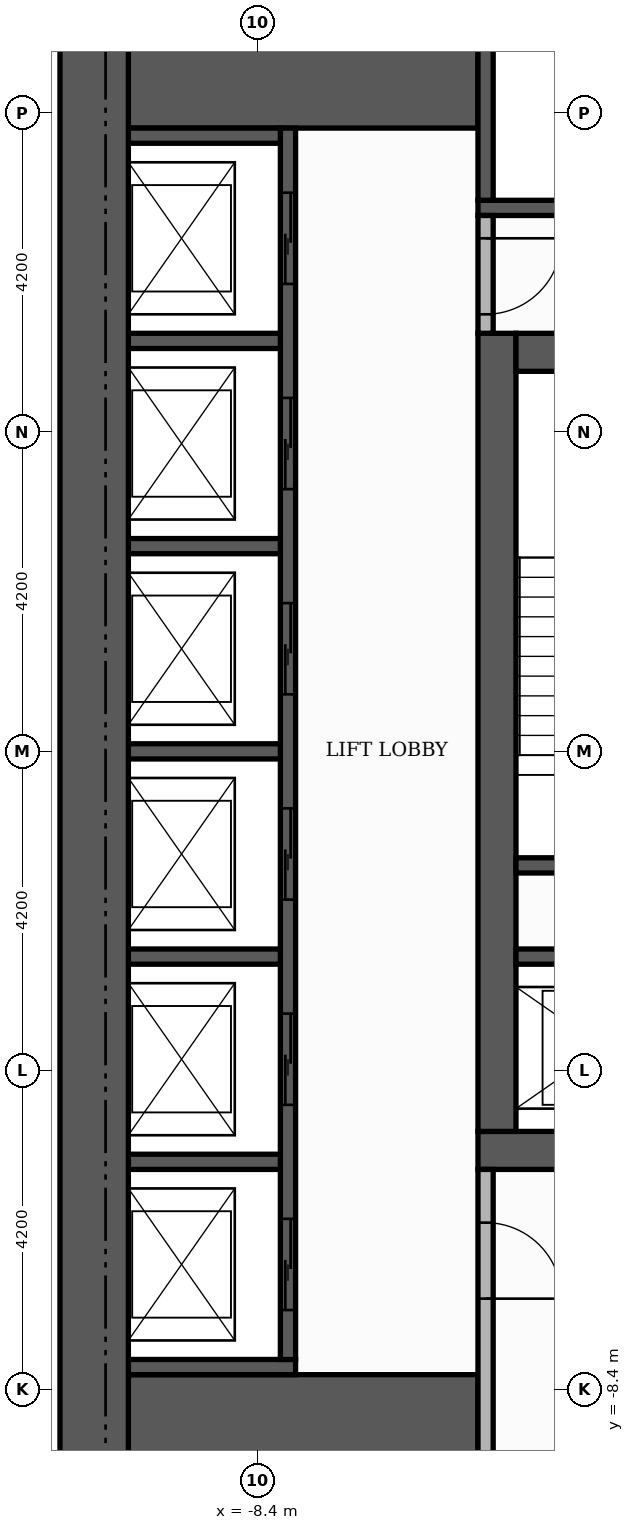
"""IFC4 building model, lengths in metres.
Left out: names, types, materials, properties, quantities, classifications, styles, units other than length and angle.
Written with IfcOpenShell. Run it as: python <this file> out.ifc"""

import sys

from ifc_helpers import new_model, si_unit, direction, frame, frame_2d, origin, place, context, subcontext, project, spatial, rectangle, extrude, element, fill, save


model = new_model("IFC4")
c1 = context("Model", 3, precision=1e-05, world=origin(), true_north=direction((0.0, 1.0)))
c2 = subcontext(c1, "Body", "Model", "MODEL_VIEW")
j1 = project(units=[si_unit("LENGTHUNIT", "METRE"), si_unit("PLANEANGLEUNIT", "RADIAN")], contexts=[c1])
p1 = place(None, origin())
s1 = spatial("IfcSite", under=j1, at=p1, CompositionType="ELEMENT")
p2 = place(p1, origin())
s2 = spatial("IfcBuilding", under=s1, at=p2, CompositionType="ELEMENT")
p3 = place(p2, frame((0.0, 0.0, 58.2)))
s3 = spatial("IfcBuildingStorey", under=s2, at=p3, CompositionType="ELEMENT", Elevation=58.2)
p4 = place(p3, frame((-5.5, -5.25, 0.0), z_axis=(0.0, 0.0, 1.0), x_axis=(1.0, 0.0, 0.0)))
e1 = element("IfcWall", 1, at=p4, inside=s3, PredefinedType="SHEAR", context=c2, shape_type="SweptSolid", body=[
    extrude(rectangle(XDim=11.0, YDim=0.5, at=frame_2d((5.5, 0.0))), origin(), (0.0, 0.0, 1.0), 3.48),
])
p5 = place(p4, frame((4.9, 0.0, 0.0)))
e2 = element("IfcOpeningElement", 2, at=p5, cuts=e1, PredefinedType="OPENING", context=c2, shape_type="SweptSolid", body=[
    extrude(rectangle(XDim=1.2, YDim=2.1, at=frame_2d((0.6, 1.05))), frame((0.0, 0.26, 0.0), z_axis=(0.0, -1.0, 0.0), x_axis=(1.0, 0.0, 0.0)), (0.0, 0.0, 1.0), 0.52),
])
p6 = place(p3, frame((-5.25, -5.0, 0.0), z_axis=(0.0, 0.0, 1.0), x_axis=(0.0, 1.0, 0.0)))
e3 = element("IfcWall", 3, at=p6, inside=s3, PredefinedType="SHEAR", context=c2, shape_type="SweptSolid", body=[
    extrude(rectangle(XDim=10.5, YDim=0.5, at=frame_2d((5.25, 0.0))), origin(), (0.0, 0.0, 1.0), 3.48),
])
p7 = place(p3, frame((-5.0, 5.25, 0.0), z_axis=(0.0, 0.0, 1.0), x_axis=(1.0, 0.0, 0.0)))
e4 = element("IfcWall", 4, at=p7, inside=s3, PredefinedType="SHEAR", context=c2, shape_type="SweptSolid", body=[
    extrude(rectangle(XDim=10.0, YDim=0.5, at=frame_2d((5.0, 0.0))), origin(), (0.0, 0.0, 1.0), 3.48),
])
p8 = place(p7, frame((4.4, 0.0, 0.0)))
e5 = element("IfcOpeningElement", 5, at=p8, cuts=e4, PredefinedType="OPENING", context=c2, shape_type="SweptSolid", body=[
    extrude(rectangle(XDim=1.2, YDim=2.1, at=frame_2d((0.6, 1.05))), frame((0.0, 0.26, 0.0), z_axis=(0.0, -1.0, 0.0), x_axis=(1.0, 0.0, 0.0)), (0.0, 0.0, 1.0), 0.52),
])
for number, where, z_axis, x_axis in (
    (6, (-10.1, -9.15, 0.0), (0.0, 0.0, 1.0), (1.0, 0.0, 0.0)),
    (7, (-10.1, 9.15, 0.0), (0.0, 0.0, 1.0), (1.0, 0.0, 0.0)),
):
    element("IfcWall", number, at=place(p3, frame(where, z_axis=z_axis, x_axis=x_axis)), inside=s3, PredefinedType="SHEAR", context=c2, shape_type="SweptSolid", body=[
        extrude(rectangle(XDim=4.6, YDim=1.9, at=frame_2d((2.3, 0.0))), origin(), (0.0, 0.0, 1.0), 3.48),
    ])
p9 = place(p3, frame((-5.0, -1.5, 0.0), z_axis=(0.0, 0.0, 1.0), x_axis=(1.0, 0.0, 0.0)))
e8 = element("IfcWall", 8, at=p9, inside=s3, PredefinedType="SHEAR", context=c2, shape_type="SweptSolid", body=[
    extrude(rectangle(XDim=3.05, YDim=0.2, at=frame_2d((1.525, 0.0))), origin(), (0.0, 0.0, 1.0), 3.48),
])
p10 = place(p3, frame((-5.5, 7.15, 0.0), z_axis=(0.0, 0.0, 1.0), x_axis=(1.0, 0.0, 0.0)))
e9 = element("IfcWall", 9, at=p10, inside=s3, PredefinedType="SHEAR", context=c2, shape_type="SweptSolid", body=[
    extrude(rectangle(XDim=6.8, YDim=0.2, at=frame_2d((3.4, 0.0))), origin(), (0.0, 0.0, 1.0), 3.48),
])
p11 = place(p3, frame((-5.4, 7.25, 0.0), z_axis=(0.0, 0.0, 1.0), x_axis=(0.0, 1.0, 0.0)))
e10 = element("IfcWall", 10, at=p11, inside=s3, PredefinedType="SHEAR", context=c2, shape_type="SweptSolid", body=[
    extrude(rectangle(XDim=2.85, YDim=0.2, at=frame_2d((1.425, 0.0))), origin(), (0.0, 0.0, 1.0), 3.48),
])
p12 = place(p3, frame((-10.1, -8.1, 0.0), z_axis=(0.0, 0.0, 1.0), x_axis=(1.0, 0.0, 0.0)))
e11 = element("IfcWall", 11, at=p12, inside=s3, PredefinedType="SHEAR", context=c2, shape_type="SweptSolid", body=[
    extrude(rectangle(XDim=2.2, YDim=0.2, at=frame_2d((1.1, 0.0))), origin(), (0.0, 0.0, 1.0), 3.48),
])
p13 = place(p3, frame((-8.0, -8.0, 0.0), z_axis=(0.0, 0.0, 1.0), x_axis=(0.0, 1.0, 0.0)))
e12 = element("IfcWall", 12, at=p13, inside=s3, PredefinedType="SHEAR", context=c2, shape_type="SweptSolid", body=[
    extrude(rectangle(XDim=16.2, YDim=0.2, at=frame_2d((8.1, 0.0))), origin(), (0.0, 0.0, 1.0), 3.48),
])
p14 = place(p13, frame((0.65, 0.0, 0.0)))
e13 = element("IfcOpeningElement", 13, at=p14, cuts=e12, PredefinedType="OPENING", context=c2, shape_type="SweptSolid", body=[
    extrude(rectangle(XDim=1.2, YDim=2.1, at=frame_2d((0.6, 1.05))), frame((0.0, 0.11, 0.0), z_axis=(0.0, -1.0, 0.0), x_axis=(1.0, 0.0, 0.0)), (0.0, 0.0, 1.0), 0.22),
])
p15 = place(p13, frame((3.35, 0.0, 0.0)))
e14 = element("IfcOpeningElement", 14, at=p15, cuts=e12, PredefinedType="OPENING", context=c2, shape_type="SweptSolid", body=[
    extrude(rectangle(XDim=1.2, YDim=2.1, at=frame_2d((0.6, 1.05))), frame((0.0, 0.11, 0.0), z_axis=(0.0, -1.0, 0.0), x_axis=(1.0, 0.0, 0.0)), (0.0, 0.0, 1.0), 0.22),
])
p16 = place(p13, frame((6.05, 0.0, 0.0)))
e15 = element("IfcOpeningElement", 15, at=p16, cuts=e12, PredefinedType="OPENING", context=c2, shape_type="SweptSolid", body=[
    extrude(rectangle(XDim=1.2, YDim=2.1, at=frame_2d((0.6, 1.05))), frame((0.0, 0.11, 0.0), z_axis=(0.0, -1.0, 0.0), x_axis=(1.0, 0.0, 0.0)), (0.0, 0.0, 1.0), 0.22),
])
p17 = place(p13, frame((8.75, 0.0, 0.0)))
e16 = element("IfcOpeningElement", 16, at=p17, cuts=e12, PredefinedType="OPENING", context=c2, shape_type="SweptSolid", body=[
    extrude(rectangle(XDim=1.2, YDim=2.1, at=frame_2d((0.6, 1.05))), frame((0.0, 0.11, 0.0), z_axis=(0.0, -1.0, 0.0), x_axis=(1.0, 0.0, 0.0)), (0.0, 0.0, 1.0), 0.22),
])
p18 = place(p13, frame((11.45, 0.0, 0.0)))
e17 = element("IfcOpeningElement", 17, at=p18, cuts=e12, PredefinedType="OPENING", context=c2, shape_type="SweptSolid", body=[
    extrude(rectangle(XDim=1.2, YDim=2.1, at=frame_2d((0.6, 1.05))), frame((0.0, 0.11, 0.0), z_axis=(0.0, -1.0, 0.0), x_axis=(1.0, 0.0, 0.0)), (0.0, 0.0, 1.0), 0.22),
])
p19 = place(p13, frame((14.15, 0.0, 0.0)))
e18 = element("IfcOpeningElement", 18, at=p19, cuts=e12, PredefinedType="OPENING", context=c2, shape_type="SweptSolid", body=[
    extrude(rectangle(XDim=1.2, YDim=2.1, at=frame_2d((0.6, 1.05))), frame((0.0, 0.11, 0.0), z_axis=(0.0, -1.0, 0.0), x_axis=(1.0, 0.0, 0.0)), (0.0, 0.0, 1.0), 0.22),
])
for number, where, z_axis, x_axis in (
    (19, (-10.1, -5.4, 0.0), (0.0, 0.0, 1.0), (1.0, 0.0, 0.0)),
    (20, (-10.1, -2.7, 0.0), (0.0, 0.0, 1.0), (1.0, 0.0, 0.0)),
):
    element("IfcWall", number, at=place(p3, frame(where, z_axis=z_axis, x_axis=x_axis)), inside=s3, PredefinedType="SHEAR", context=c2, shape_type="SweptSolid", body=[
        extrude(rectangle(XDim=2.0, YDim=0.2, at=frame_2d((1.0, 0.0))), origin(), (0.0, 0.0, 1.0), 3.48),
    ])
p20 = place(p3, frame((-5.0, -2.7, 0.0), z_axis=(0.0, 0.0, 1.0), x_axis=(1.0, 0.0, 0.0)))
e21 = element("IfcWall", 21, at=p20, inside=s3, PredefinedType="SHEAR", context=c2, shape_type="SweptSolid", body=[
    extrude(rectangle(XDim=2.85, YDim=0.2, at=frame_2d((1.425, 0.0))), origin(), (0.0, 0.0, 1.0), 3.48),
])
for number, where, z_axis, x_axis in (
    (22, (-10.1, 0.0, 0.0), (0.0, 0.0, 1.0), (1.0, 0.0, 0.0)),
    (23, (-10.1, 2.7, 0.0), (0.0, 0.0, 1.0), (1.0, 0.0, 0.0)),
    (24, (-10.1, 5.4, 0.0), (0.0, 0.0, 1.0), (1.0, 0.0, 0.0)),
    (25, (-10.1, 8.1, 0.0), (0.0, 0.0, 1.0), (1.0, 0.0, 0.0)),
):
    element("IfcWall", number, at=place(p3, frame(where, z_axis=z_axis, x_axis=x_axis)), inside=s3, PredefinedType="SHEAR", context=c2, shape_type="SweptSolid", body=[
        extrude(rectangle(XDim=2.0, YDim=0.2, at=frame_2d((1.0, 0.0))), origin(), (0.0, 0.0, 1.0), 3.48),
    ])
p21 = place(p3, frame((-10.55, -10.1, 0.0), z_axis=(0.0, 0.0, 1.0), x_axis=(0.0, 1.0, 0.0)))
e26 = element("IfcWall", 26, at=p21, inside=s3, PredefinedType="SHEAR", context=c2, shape_type="SweptSolid", body=[
    extrude(rectangle(XDim=20.2, YDim=0.9, at=frame_2d((10.1, 0.0))), origin(), (0.0, 0.0, 1.0), 3.48),
])
p22 = place(p3, frame((-5.4, -10.1, 0.0), z_axis=(0.0, 0.0, 1.0), x_axis=(0.0, 1.0, 0.0)))
e27 = element("IfcWall", 27, at=p22, inside=s3, PredefinedType="PARTITIONING", context=c2, shape_type="SweptSolid", body=[
    extrude(rectangle(XDim=4.6, YDim=0.2, at=frame_2d((2.3, 0.0))), origin(), (0.0, 0.0, 1.0), 3.48),
])
p23 = place(p22, frame((2.9, 0.0, 0.0)))
e28 = element("IfcOpeningElement", 28, at=p23, cuts=e27, PredefinedType="OPENING", context=c2, shape_type="SweptSolid", body=[
    extrude(rectangle(XDim=1.0, YDim=2.1, at=frame_2d((0.5, 1.05))), frame((0.0, 0.11, 0.0), z_axis=(0.0, -1.0, 0.0), x_axis=(1.0, 0.0, 0.0)), (0.0, 0.0, 1.0), 0.22),
])
p24 = place(p3, frame((-5.4, 5.5, 0.0), z_axis=(0.0, 0.0, 1.0), x_axis=(0.0, 1.0, 0.0)))
e29 = element("IfcWall", 29, at=p24, inside=s3, PredefinedType="PARTITIONING", context=c2, shape_type="SweptSolid", body=[
    extrude(rectangle(XDim=1.55, YDim=0.2, at=frame_2d((0.775, 0.0))), origin(), (0.0, 0.0, 1.0), 3.48),
])
p25 = place(p24, frame((0.25, 0.0, 0.0)))
e30 = element("IfcOpeningElement", 30, at=p25, cuts=e29, PredefinedType="OPENING", context=c2, shape_type="SweptSolid", body=[
    extrude(rectangle(XDim=1.0, YDim=2.1, at=frame_2d((0.5, 1.05))), frame((0.0, 0.11, 0.0), z_axis=(0.0, -1.0, 0.0), x_axis=(1.0, 0.0, 0.0)), (0.0, 0.0, 1.0), 0.22),
])
p26 = place(p14, origin())
e31 = element("IfcDoor", 31, at=p26, inside=s3, OperationType="SLIDING_TO_LEFT", PredefinedType="DOOR", context=c2, shape_type="SweptSolid", body=[
    extrude(rectangle(XDim=1.2, YDim=2.1, at=frame_2d((0.6, 1.05))), frame((0.0, 0.025, 0.0), z_axis=(0.0, -1.0, 0.0), x_axis=(1.0, 0.0, 0.0)), (0.0, 0.0, 1.0), 0.05),
])
fill(e13, e31)
p27 = place(p15, origin())
e32 = element("IfcDoor", 32, at=p27, inside=s3, OperationType="SLIDING_TO_LEFT", PredefinedType="DOOR", context=c2, shape_type="SweptSolid", body=[
    extrude(rectangle(XDim=1.2, YDim=2.1, at=frame_2d((0.6, 1.05))), frame((0.0, 0.025, 0.0), z_axis=(0.0, -1.0, 0.0), x_axis=(1.0, 0.0, 0.0)), (0.0, 0.0, 1.0), 0.05),
])
fill(e14, e32)
p28 = place(p16, origin())
e33 = element("IfcDoor", 33, at=p28, inside=s3, OperationType="SLIDING_TO_LEFT", PredefinedType="DOOR", context=c2, shape_type="SweptSolid", body=[
    extrude(rectangle(XDim=1.2, YDim=2.1, at=frame_2d((0.6, 1.05))), frame((0.0, 0.025, 0.0), z_axis=(0.0, -1.0, 0.0), x_axis=(1.0, 0.0, 0.0)), (0.0, 0.0, 1.0), 0.05),
])
fill(e15, e33)
p29 = place(p17, origin())
e34 = element("IfcDoor", 34, at=p29, inside=s3, OperationType="SLIDING_TO_LEFT", PredefinedType="DOOR", context=c2, shape_type="SweptSolid", body=[
    extrude(rectangle(XDim=1.2, YDim=2.1, at=frame_2d((0.6, 1.05))), frame((0.0, 0.025, 0.0), z_axis=(0.0, -1.0, 0.0), x_axis=(1.0, 0.0, 0.0)), (0.0, 0.0, 1.0), 0.05),
])
fill(e16, e34)
p30 = place(p18, origin())
e35 = element("IfcDoor", 35, at=p30, inside=s3, OperationType="SLIDING_TO_LEFT", PredefinedType="DOOR", context=c2, shape_type="SweptSolid", body=[
    extrude(rectangle(XDim=1.2, YDim=2.1, at=frame_2d((0.6, 1.05))), frame((0.0, 0.025, 0.0), z_axis=(0.0, -1.0, 0.0), x_axis=(1.0, 0.0, 0.0)), (0.0, 0.0, 1.0), 0.05),
])
fill(e17, e35)
p31 = place(p19, origin())
e36 = element("IfcDoor", 36, at=p31, inside=s3, OperationType="SLIDING_TO_LEFT", PredefinedType="DOOR", context=c2, shape_type="SweptSolid", body=[
    extrude(rectangle(XDim=1.2, YDim=2.1, at=frame_2d((0.6, 1.05))), frame((0.0, 0.025, 0.0), z_axis=(0.0, -1.0, 0.0), x_axis=(1.0, 0.0, 0.0)), (0.0, 0.0, 1.0), 0.05),
])
fill(e18, e36)
p32 = place(p25, frame((1.0, 0.0, 0.0), z_axis=(0.0, 0.0, 1.0), x_axis=(-1.0, 0.0, 0.0)))
e37 = element("IfcDoor", 37, at=p32, inside=s3, OperationType="SINGLE_SWING_RIGHT", PredefinedType="DOOR", context=c2, shape_type="SweptSolid", body=[
    extrude(rectangle(XDim=1.0, YDim=2.1, at=frame_2d((0.5, 1.05))), frame((0.0, 0.025, 0.0), z_axis=(0.0, -1.0, 0.0), x_axis=(1.0, 0.0, 0.0)), (0.0, 0.0, 1.0), 0.05),
])
fill(e30, e37)
p33 = place(p23, frame((1.0, 0.0, 0.0), z_axis=(0.0, 0.0, 1.0), x_axis=(-1.0, 0.0, 0.0)))
e38 = element("IfcDoor", 38, at=p33, inside=s3, OperationType="SINGLE_SWING_LEFT", PredefinedType="DOOR", context=c2, shape_type="SweptSolid", body=[
    extrude(rectangle(XDim=1.0, YDim=2.1, at=frame_2d((0.5, 1.05))), frame((0.0, 0.025, 0.0), z_axis=(0.0, -1.0, 0.0), x_axis=(1.0, 0.0, 0.0)), (0.0, 0.0, 1.0), 0.05),
])
fill(e28, e38)
save(model, sys.argv[1])
